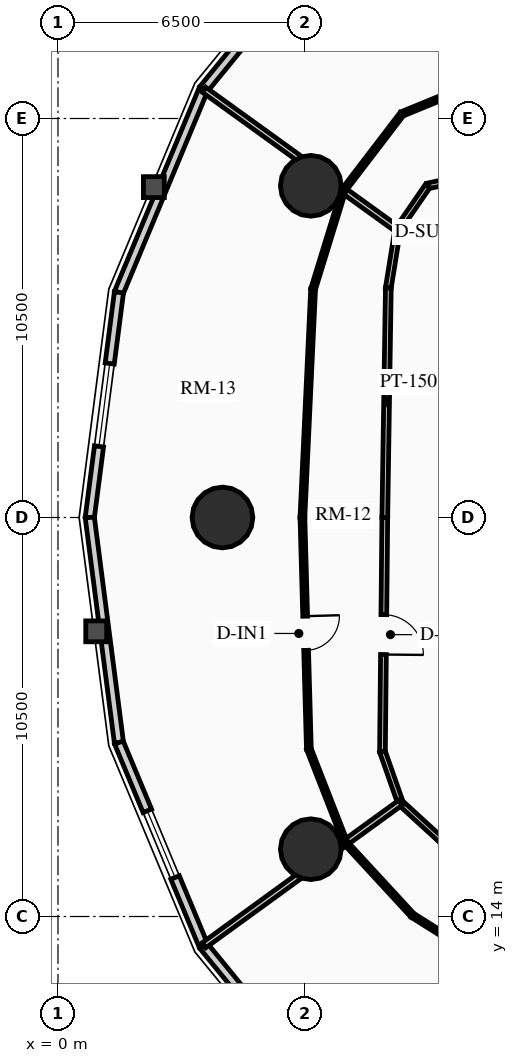
"""IFC4 building model, lengths in metres.
Left out: names, types, materials, properties, quantities, classifications, styles, units other than length and angle.
Written with IfcOpenShell. Run it as: python <this file> out.ifc"""

import sys

from ifc_helpers import new_model, si_unit, direction, frame, frame_2d, origin, origin_2d, place, context, subcontext, project, spatial, rectangle, circle, extrude, source, transform, mapped, element, fill, save


model = new_model("IFC4")
c1 = context("Model", 3, precision=1e-05, world=origin(), true_north=direction((0.0, 1.0)))
c2 = subcontext(c1, "Body", "Model", "MODEL_VIEW")
j1 = project(units=[si_unit("LENGTHUNIT", "METRE"), si_unit("PLANEANGLEUNIT", "RADIAN")], contexts=[c1])
p1 = place(None, origin())
s1 = spatial("IfcSite", under=j1, at=p1, CompositionType="ELEMENT")
p2 = place(p1, origin())
s2 = spatial("IfcBuilding", under=s1, at=p2, CompositionType="ELEMENT")
p3 = place(p2, frame((0.0, 0.0, 59.83)))
s3 = spatial("IfcBuildingStorey", under=s2, at=p3, CompositionType="ELEMENT", Elevation=59.83)
for number, where, z_axis, x_axis in (
    (1, (6.653, 33.229, 0.0), (0.0, 0.0, 1.0), (1.0, 0.0, 0.0)),
    (2, (4.328, 24.5, 0.0), (0.0, 0.0, 1.0), (1.0, 0.0, 0.0)),
    (3, (6.653, 15.771, 0.0), (0.0, 0.0, 1.0), (1.0, 0.0, 0.0)),
):
    element("IfcColumn", number, at=place(p3, frame(where, z_axis=z_axis, x_axis=x_axis)), inside=s3, PredefinedType="USERDEFINED", context=c2, shape_type="SweptSolid", body=[
        extrude(circle(Radius=0.8, at=origin_2d()), origin(), (0.0, 0.0, 1.0), 2.91),
    ])
p4 = place(p3, frame((3.828, 35.768, 0.0), z_axis=(0.0, 0.0, 1.0), x_axis=(0.632713287022, 0.77438614168, 0.0)))
e4 = element("IfcWall", 4, at=p4, inside=s3, PredefinedType="SOLIDWALL", context=c2, shape_type="SweptSolid", body=[
    extrude(rectangle(XDim=5.477, YDim=0.24, at=frame_2d((2.738, 0.0))), origin(), (0.0, 0.0, 1.0), 2.073),
])
m1 = source(origin(), c2, "Body", "SweptSolid", [
    extrude(rectangle(XDim=1.9, YDim=1.35, at=frame_2d((0.95, 0.675))), frame((0.0, 0.13, 0.0), z_axis=(0.0, -1.0, 0.0), x_axis=(1.0, 0.0, 0.0)), (0.0, 0.0, 1.0), 0.26),
])
p5 = place(p4, frame((1.788, 0.0, 0.65)))
e5 = element("IfcOpeningElement", 5, at=p5, cuts=e4, PredefinedType="OPENING", context=c2, shape_type="MappedRepresentation", body=[
    mapped(m1, transform((0.0, 0.0, 0.0), x_axis=(1.0, 0.0, 0.0), y_axis=(0.0, 1.0, 0.0), z_axis=(0.0, 0.0, 1.0), scale=1.0)),
])
p6 = place(p3, frame((1.604, 30.424, 0.0), z_axis=(0.0, 0.0, 1.0), x_axis=(0.384348836956, 0.923187939442, 0.0)))
e6 = element("IfcWall", 6, at=p6, inside=s3, PredefinedType="SOLIDWALL", context=c2, shape_type="SweptSolid", body=[
    extrude(rectangle(XDim=5.789, YDim=0.24, at=frame_2d((2.894, 0.0))), origin(), (0.0, 0.0, 1.0), 2.073),
])
p7 = place(p3, frame((0.837, 24.5, 0.0), z_axis=(0.0, 0.0, 1.0), x_axis=(0.128339641463, 0.991730274031, 0.0)))
e7 = element("IfcWall", 7, at=p7, inside=s3, PredefinedType="SOLIDWALL", context=c2, shape_type="SweptSolid", body=[
    extrude(rectangle(XDim=5.973, YDim=0.24, at=frame_2d((2.987, 0.0))), origin(), (0.0, 0.0, 1.0), 2.073),
])
m2 = source(origin(), c2, "Body", "SweptSolid", [
    extrude(rectangle(XDim=2.2, YDim=1.35, at=frame_2d((1.1, 0.675))), frame((0.0, 0.13, 0.0), z_axis=(0.0, -1.0, 0.0), x_axis=(1.0, 0.0, 0.0)), (0.0, 0.0, 1.0), 0.26),
])
p8 = place(p7, frame((1.887, 0.0, 0.65)))
e8 = element("IfcOpeningElement", 8, at=p8, cuts=e7, PredefinedType="OPENING", context=c2, shape_type="MappedRepresentation", body=[
    mapped(m2, transform((0.0, 0.0, 0.0), x_axis=(1.0, 0.0, 0.0), y_axis=(0.0, 1.0, 0.0), z_axis=(0.0, 0.0, 1.0), scale=1.0)),
])
p9 = place(p3, frame((1.604, 18.576, 0.0), z_axis=(0.0, 0.0, 1.0), x_axis=(-0.128339641463, 0.991730274031, 0.0)))
e9 = element("IfcWall", 9, at=p9, inside=s3, PredefinedType="SOLIDWALL", context=c2, shape_type="SweptSolid", body=[
    extrude(rectangle(XDim=5.973, YDim=0.24, at=frame_2d((2.987, 0.0))), origin(), (0.0, 0.0, 1.0), 2.073),
])
p10 = place(p3, frame((3.828, 13.232, 0.0), z_axis=(0.0, 0.0, 1.0), x_axis=(-0.384348836956, 0.923187939442, 0.0)))
e10 = element("IfcWall", 10, at=p10, inside=s3, PredefinedType="SOLIDWALL", context=c2, shape_type="SweptSolid", body=[
    extrude(rectangle(XDim=5.789, YDim=0.24, at=frame_2d((2.894, 0.0))), origin(), (0.0, 0.0, 1.0), 2.073),
])
p11 = place(p10, frame((1.944, 0.0, 0.65)))
e11 = element("IfcOpeningElement", 11, at=p11, cuts=e10, PredefinedType="OPENING", context=c2, shape_type="MappedRepresentation", body=[
    mapped(m1, transform((0.0, 0.0, 0.0), x_axis=(1.0, 0.0, 0.0), y_axis=(0.0, 1.0, 0.0), z_axis=(0.0, 0.0, 1.0), scale=1.0)),
])
p12 = place(p3, frame((7.293, 8.991, 0.0), z_axis=(0.0, 0.0, 1.0), x_axis=(-0.632713287022, 0.77438614168, 0.0)))
e12 = element("IfcWall", 12, at=p12, inside=s3, PredefinedType="SOLIDWALL", context=c2, shape_type="SweptSolid", body=[
    extrude(rectangle(XDim=5.477, YDim=0.24, at=frame_2d((2.738, 0.0))), origin(), (0.0, 0.0, 1.0), 2.073),
])
p13 = place(p3, frame((11.62, 33.637, 0.0), z_axis=(0.0, 0.0, 1.0), x_axis=(-0.97702579435, -0.213121085711, 0.0)))
e13 = element("IfcWall", 13, at=p13, inside=s3, PredefinedType="PARTITIONING", context=c2, shape_type="SweptSolid", body=[
    extrude(rectangle(XDim=1.935, YDim=0.15, at=frame_2d((0.967, 0.0))), origin(), (0.0, 0.0, 1.0), 2.159),
])
m3 = source(origin(), c2, "Body", "SweptSolid", [
    extrude(rectangle(XDim=1.05, YDim=2.015, at=frame_2d((0.525, 1.007))), frame((0.0, 0.085, 0.0), z_axis=(0.0, -1.0, 0.0), x_axis=(1.0, 0.0, 0.0)), (0.0, 0.0, 1.0), 0.17),
])
p14 = place(p13, frame((0.442, 0.0, 0.0)))
e14 = element("IfcOpeningElement", 14, at=p14, cuts=e13, PredefinedType="OPENING", context=c2, shape_type="MappedRepresentation", body=[
    mapped(m3, transform((0.0, 0.0, 0.0), x_axis=(1.0, 0.0, 0.0), y_axis=(0.0, 1.0, 0.0), z_axis=(0.0, 0.0, 1.0), scale=1.0)),
])
p15 = place(p3, frame((9.729, 33.225, 0.0), z_axis=(0.0, 0.0, 1.0), x_axis=(-0.567183649484, -0.82359134755, 0.0)))
e15 = element("IfcWall", 15, at=p15, inside=s3, PredefinedType="PARTITIONING", context=c2, shape_type="SweptSolid", body=[
    extrude(rectangle(XDim=1.392, YDim=0.15, at=frame_2d((0.696, 0.0))), origin(), (0.0, 0.0, 1.0), 2.159),
])
p16 = place(p3, frame((8.94, 32.078, 0.0), z_axis=(0.0, 0.0, 1.0), x_axis=(-0.159148467753, -0.98725466077, 0.0)))
e16 = element("IfcWall", 16, at=p16, inside=s3, PredefinedType="PARTITIONING", context=c2, shape_type="SweptSolid", body=[
    extrude(rectangle(XDim=1.554, YDim=0.15, at=frame_2d((0.777, 0.0))), origin(), (0.0, 0.0, 1.0), 2.205),
])
p17 = place(p3, frame((8.693, 30.544, 0.0), z_axis=(0.0, 0.0, 1.0), x_axis=(-0.015307007986, -0.99988284089, 0.0)))
e17 = element("IfcWall", 17, at=p17, inside=s3, PredefinedType="PARTITIONING", context=c2, shape_type="SweptSolid", body=[
    extrude(rectangle(XDim=6.045, YDim=0.15, at=frame_2d((3.022, 0.0))), origin(), (0.0, 0.0, 1.0), 2.635),
])
p18 = place(p3, frame((8.6, 24.5, 0.0), z_axis=(0.0, 0.0, 1.0), x_axis=(-0.010023665349, -0.999949761805, 0.0)))
e18 = element("IfcWall", 18, at=p18, inside=s3, PredefinedType="PARTITIONING", context=c2, shape_type="SweptSolid", body=[
    extrude(rectangle(XDim=6.162, YDim=0.15, at=frame_2d((3.081, 0.0))), origin(), (0.0, 0.0, 1.0), 2.159),
])
p19 = place(p18, frame((2.556, 0.0, 0.0)))
e19 = element("IfcOpeningElement", 19, at=p19, cuts=e18, PredefinedType="OPENING", context=c2, shape_type="MappedRepresentation", body=[
    mapped(m3, transform((0.0, 0.0, 0.0), x_axis=(1.0, 0.0, 0.0), y_axis=(0.0, 1.0, 0.0), z_axis=(0.0, 0.0, 1.0), scale=1.0)),
])
p20 = place(p3, frame((8.538, 18.338, 0.0), z_axis=(0.0, 0.0, 1.0), x_axis=(0.331358150167, -0.94350504838, 0.0)))
e20 = element("IfcWall", 20, at=p20, inside=s3, PredefinedType="PARTITIONING", context=c2, shape_type="SweptSolid", body=[
    extrude(rectangle(XDim=1.424, YDim=0.15, at=frame_2d((0.712, 0.0))), origin(), (0.0, 0.0, 1.0), 2.205),
])
p21 = place(p3, frame((9.01, 16.994, 0.0), z_axis=(0.0, 0.0, 1.0), x_axis=(0.737701798986, -0.67512669609, 0.0)))
e21 = element("IfcWall", 21, at=p21, inside=s3, PredefinedType="PARTITIONING", context=c2, shape_type="SweptSolid", body=[
    extrude(rectangle(XDim=1.498, YDim=0.15, at=frame_2d((0.749, 0.0))), origin(), (0.0, 0.0, 1.0), 2.159),
])
p22 = place(p3, frame((8.94, 32.078, 0.0), z_axis=(0.0, 0.0, 1.0), x_axis=(-0.810854375189, 0.585247966453, 0.0)))
e22 = element("IfcWall", 22, at=p22, inside=s3, PredefinedType="PARTITIONING", context=c2, shape_type="SweptSolid", body=[
    extrude(rectangle(XDim=6.284, YDim=0.16, at=frame_2d((3.142, 0.0))), origin(), (0.0, 0.0, 1.0), 2.073),
])
p23 = place(p3, frame((9.01, 16.994, 0.0), z_axis=(0.0, 0.0, 1.0), x_axis=(-0.809215422166, -0.58751204288, 0.0)))
e23 = element("IfcWall", 23, at=p23, inside=s3, PredefinedType="PARTITIONING", context=c2, shape_type="SweptSolid", body=[
    extrude(rectangle(XDim=6.384, YDim=0.16, at=frame_2d((3.192, 0.0))), origin(), (0.0, 0.0, 1.0), 2.073),
])
p24 = place(p3, frame((11.633, 36.178, 0.0), z_axis=(0.0, 0.0, 1.0), x_axis=(-0.92528752303, -0.379266396779, 0.0)))
e24 = element("IfcWall", 24, at=p24, inside=s3, PredefinedType="PARTITIONING", context=c2, shape_type="SweptSolid", body=[
    extrude(rectangle(XDim=2.791, YDim=0.125, at=frame_2d((1.395, 0.0))), origin(), (0.0, 0.0, 1.0), 2.205),
])
p25 = place(p3, frame((9.051, 35.12, 0.0), z_axis=(0.0, 0.0, 1.0), x_axis=(-0.607256827378, -0.79450559822, 0.0)))
e25 = element("IfcWall", 25, at=p25, inside=s3, PredefinedType="PARTITIONING", context=c2, shape_type="SweptSolid", body=[
    extrude(rectangle(XDim=2.532, YDim=0.125, at=frame_2d((1.266, 0.0))), origin(), (0.0, 0.0, 1.0), 2.073),
])
p26 = place(p3, frame((7.513, 33.108, 0.0), z_axis=(0.0, 0.0, 1.0), x_axis=(-0.294167851511, -0.955753773279, 0.0)))
e26 = element("IfcWall", 26, at=p26, inside=s3, PredefinedType="PARTITIONING", context=c2, shape_type="SweptSolid", body=[
    extrude(rectangle(XDim=2.72, YDim=0.125, at=frame_2d((1.36, 0.0))), origin(), (0.0, 0.0, 1.0), 2.159),
])
p27 = place(p3, frame((6.713, 30.509, 0.0), z_axis=(0.0, 0.0, 1.0), x_axis=(-0.046755247216, -0.998906375422, 0.0)))
e27 = element("IfcWall", 27, at=p27, inside=s3, PredefinedType="PARTITIONING", context=c2, shape_type="SweptSolid", body=[
    extrude(rectangle(XDim=6.015, YDim=0.125, at=frame_2d((3.008, 0.0))), origin(), (0.0, 0.0, 1.0), 2.635),
])
p28 = place(p3, frame((6.432, 24.5, 0.0), z_axis=(0.0, 0.0, 1.0), x_axis=(0.027874896751, -0.999611419568, 0.0)))
e28 = element("IfcWall", 28, at=p28, inside=s3, PredefinedType="PARTITIONING", context=c2, shape_type="SweptSolid", body=[
    extrude(rectangle(XDim=6.096, YDim=0.125, at=frame_2d((3.048, 0.0))), origin(), (0.0, 0.0, 1.0), 2.159),
])
m4 = source(origin(), c2, "Body", "SweptSolid", [
    extrude(rectangle(XDim=0.9, YDim=2.005, at=frame_2d((0.45, 1.002))), frame((0.0, 0.073, 0.0), z_axis=(0.0, -1.0, 0.0), x_axis=(1.0, 0.0, 0.0)), (0.0, 0.0, 1.0), 0.145),
])
p29 = place(p28, frame((2.598, 0.0, 0.0)))
e29 = element("IfcOpeningElement", 29, at=p29, cuts=e28, PredefinedType="OPENING", context=c2, shape_type="MappedRepresentation", body=[
    mapped(m4, transform((0.0, 0.0, 0.0), x_axis=(1.0, 0.0, 0.0), y_axis=(0.0, 1.0, 0.0), z_axis=(0.0, 0.0, 1.0), scale=1.0)),
])
p30 = place(p3, frame((6.602, 18.406, 0.0), z_axis=(0.0, 0.0, 1.0), x_axis=(0.363943166681, -0.931421156849, 0.0)))
e30 = element("IfcWall", 30, at=p30, inside=s3, PredefinedType="PARTITIONING", context=c2, shape_type="SweptSolid", body=[
    extrude(rectangle(XDim=2.644, YDim=0.125, at=frame_2d((1.322, 0.0))), origin(), (0.0, 0.0, 1.0), 2.159),
])
p31 = place(p3, frame((7.564, 15.944, 0.0), z_axis=(0.0, 0.0, 1.0), x_axis=(0.677781429023, -0.735263445624, 0.0)))
e31 = element("IfcWall", 31, at=p31, inside=s3, PredefinedType="PARTITIONING", context=c2, shape_type="SweptSolid", body=[
    extrude(rectangle(XDim=2.604, YDim=0.125, at=frame_2d((1.302, 0.0))), origin(), (0.0, 0.0, 1.0), 2.635),
])
p32 = place(p3, frame((9.329, 14.03, 0.0), z_axis=(0.0, 0.0, 1.0), x_axis=(0.846499184235, -0.532390017834, 0.0)))
e32 = element("IfcWall", 32, at=p32, inside=s3, PredefinedType="PARTITIONING", context=c2, shape_type="SweptSolid", body=[
    extrude(rectangle(XDim=2.586, YDim=0.125, at=frame_2d((1.293, 0.0))), origin(), (0.0, 0.0, 1.0), 2.205),
])
m5 = source(origin(), c2, "Body", "SweptSolid", [
    extrude(rectangle(XDim=2.2, YDim=1.35, at=frame_2d((1.1, 0.675))), frame((0.0, 0.03, 0.0), z_axis=(0.0, -1.0, 0.0), x_axis=(1.0, 0.0, 0.0)), (0.0, 0.0, 1.0), 0.06),
])
p33 = place(p8, origin())
e33 = element("IfcWindow", 33, at=p33, inside=s3, PartitioningType="DOUBLE_PANEL_VERTICAL", PredefinedType="WINDOW", context=c2, shape_type="MappedRepresentation", body=[
    mapped(m5, transform((0.0, 0.0, 0.0), x_axis=(1.0, 0.0, 0.0), y_axis=(0.0, 1.0, 0.0), z_axis=(0.0, 0.0, 1.0), scale=1.0)),
])
fill(e8, e33)
m6 = source(origin(), c2, "Body", "SweptSolid", [
    extrude(rectangle(XDim=1.9, YDim=1.35, at=frame_2d((0.95, 0.675))), frame((0.0, 0.03, 0.0), z_axis=(0.0, -1.0, 0.0), x_axis=(1.0, 0.0, 0.0)), (0.0, 0.0, 1.0), 0.06),
])
p34 = place(p11, origin())
e34 = element("IfcWindow", 34, at=p34, inside=s3, PartitioningType="DOUBLE_PANEL_VERTICAL", PredefinedType="WINDOW", context=c2, shape_type="MappedRepresentation", body=[
    mapped(m6, transform((0.0, 0.0, 0.0), x_axis=(1.0, 0.0, 0.0), y_axis=(0.0, 1.0, 0.0), z_axis=(0.0, 0.0, 1.0), scale=1.0)),
])
fill(e11, e34)
m7 = source(origin(), c2, "Body", "SweptSolid", [
    extrude(rectangle(XDim=1.05, YDim=2.015, at=frame_2d((0.525, 1.007))), frame((0.0, 0.025, 0.0), z_axis=(0.0, -1.0, 0.0), x_axis=(1.0, 0.0, 0.0)), (0.0, 0.0, 1.0), 0.05),
])
p35 = place(p19, origin())
e35 = element("IfcDoor", 35, at=p35, inside=s3, OperationType="SINGLE_SWING_RIGHT", PredefinedType="DOOR", context=c2, shape_type="MappedRepresentation", body=[
    mapped(m7, transform((0.0, 0.0, 0.0), x_axis=(1.0, 0.0, 0.0), y_axis=(0.0, 1.0, 0.0), z_axis=(0.0, 0.0, 1.0), scale=1.0)),
])
fill(e19, e35)
m8 = source(origin(), c2, "Body", "SweptSolid", [
    extrude(rectangle(XDim=0.9, YDim=2.005, at=frame_2d((0.45, 1.002))), frame((0.0, 0.025, 0.0), z_axis=(0.0, -1.0, 0.0), x_axis=(1.0, 0.0, 0.0)), (0.0, 0.0, 1.0), 0.05),
])
p36 = place(p29, origin())
e36 = element("IfcDoor", 36, at=p36, inside=s3, OperationType="SINGLE_SWING_LEFT", PredefinedType="DOOR", context=c2, shape_type="MappedRepresentation", body=[
    mapped(m8, transform((0.0, 0.0, 0.0), x_axis=(1.0, 0.0, 0.0), y_axis=(0.0, 1.0, 0.0), z_axis=(0.0, 0.0, 1.0), scale=1.0)),
])
fill(e29, e36)
save(model, sys.argv[1])
